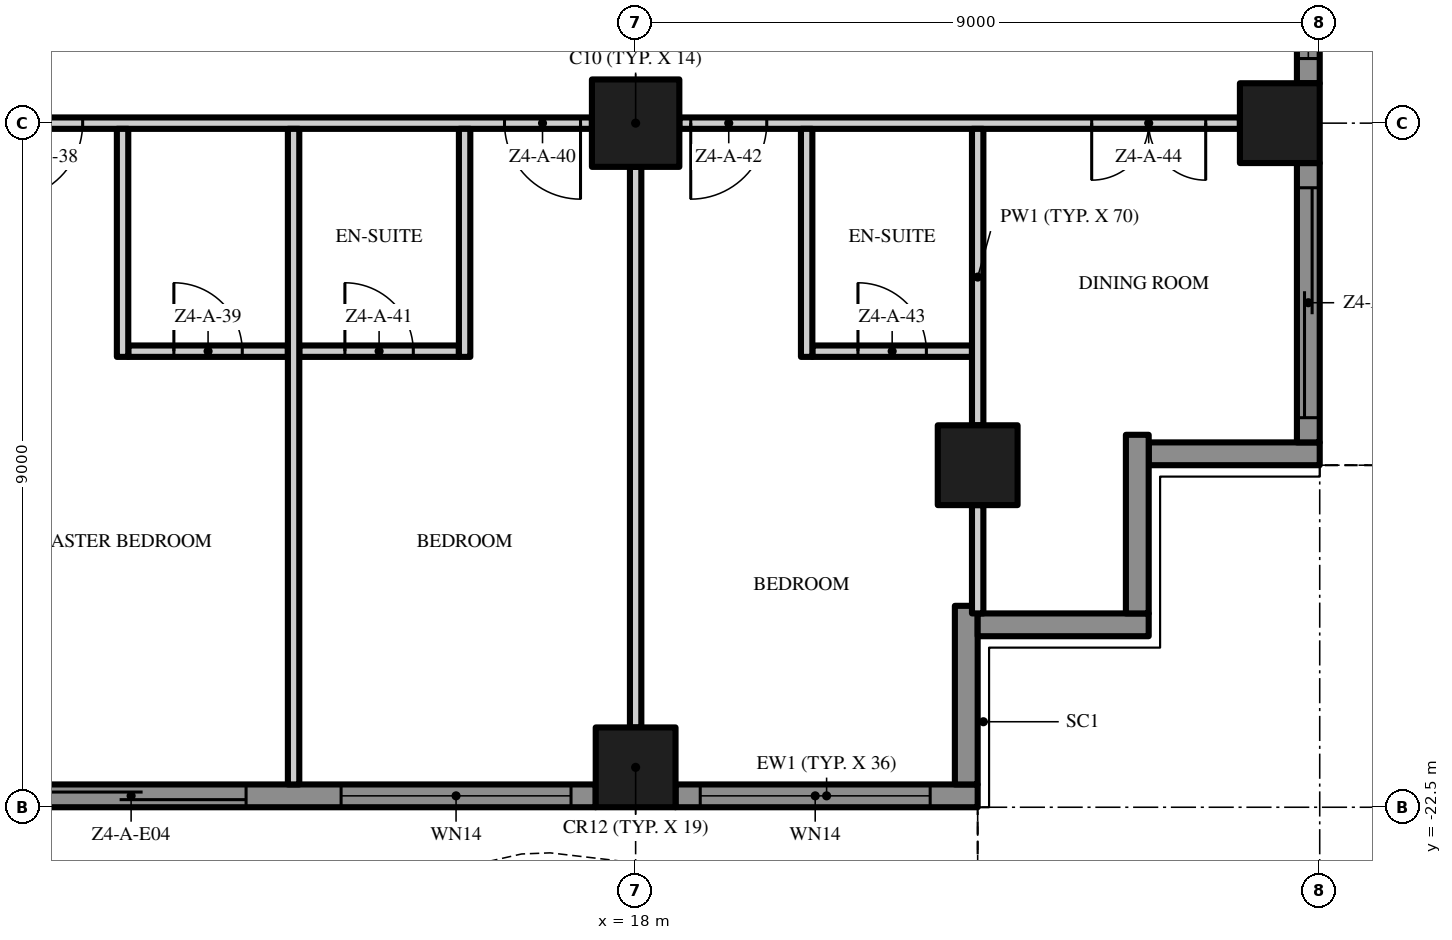
"""IFC4 building model, lengths in metres.
Left out: names, types, materials, properties, quantities, classifications, styles, units other than length and angle.
Written with IfcOpenShell. Run it as: python <this file> out.ifc"""

import sys

from ifc_helpers import new_model, si_unit, direction, frame, frame_2d, origin, origin_2d, place, context, subcontext, project, spatial, polyline, rectangle, outline, extrude, element, fill, save


model = new_model("IFC4")
c1 = context("Model", 3, precision=1e-05, world=origin(), true_north=direction((0.0, 1.0)))
c2 = subcontext(c1, "Body", "Model", "MODEL_VIEW")
j1 = project(units=[si_unit("LENGTHUNIT", "METRE"), si_unit("PLANEANGLEUNIT", "RADIAN")], contexts=[c1])
p1 = place(None, origin())
s1 = spatial("IfcSite", under=j1, at=p1, CompositionType="ELEMENT")
p2 = place(p1, origin())
s2 = spatial("IfcBuilding", under=s1, at=p2, CompositionType="ELEMENT")
p3 = place(p2, frame((0.0, 0.0, 184.4)))
s3 = spatial("IfcBuildingStorey", under=s2, at=p3, CompositionType="ELEMENT", Elevation=184.4)
p4 = place(p3, frame((18.0, -13.5, 0.0), z_axis=(0.0, 0.0, 1.0), x_axis=(1.0, 0.0, 0.0)))
e1 = element("IfcColumn", 1, at=p4, inside=s3, PredefinedType="COLUMN", context=c2, shape_type="SweptSolid", body=[
    extrude(rectangle(XDim=1.15, YDim=1.15, at=origin_2d()), origin(), (0.0, 0.0, 1.0), 3.5),
])
for number, where, z_axis, x_axis in (
    (2, (18.0, -21.975, 0.0), (0.0, 0.0, 1.0), (1.0, 0.0, 0.0)),
    (3, (26.475, -13.5, 0.0), (0.0, 0.0, 1.0), (1.0, 0.0, 0.0)),
    (4, (22.5, -18.0, 0.0), (0.0, 0.0, 1.0), (1.0, 0.0, 0.0)),
):
    element("IfcColumn", number, at=place(p3, frame(where, z_axis=z_axis, x_axis=x_axis)), inside=s3, PredefinedType="COLUMN", context=c2, shape_type="SweptSolid", body=[
        extrude(rectangle(XDim=1.05, YDim=1.05, at=origin_2d()), origin(), (0.0, 0.0, 1.0), 3.5),
    ])
p5 = place(p3, frame((17.475, -22.35, 0.0), z_axis=(0.0, 0.0, 1.0), x_axis=(-1.0, 0.0, 0.0)))
e5 = element("IfcWall", 5, at=p5, inside=s3, PredefinedType="SOLIDWALL", context=c2, shape_type="SweptSolid", body=[
    extrude(rectangle(XDim=7.95, YDim=0.3, at=frame_2d((3.975, 0.0))), origin(), (0.0, 0.0, 1.0), 3.5),
])
p6 = place(p5, frame((4.6, 0.0, 0.0)))
e6 = element("IfcOpeningElement", 6, at=p6, cuts=e5, PredefinedType="OPENING", context=c2, shape_type="SweptSolid", body=[
    extrude(rectangle(XDim=3.025, YDim=2.4, at=frame_2d((1.512, 1.2))), frame((0.0, 0.16, 0.0), z_axis=(0.0, -1.0, 0.0), x_axis=(1.0, 0.0, 0.0)), (0.0, 0.0, 1.0), 0.32),
])
p7 = place(p5, frame((0.325, 0.0, 0.45)))
e7 = element("IfcOpeningElement", 7, at=p7, cuts=e5, PredefinedType="OPENING", context=c2, shape_type="SweptSolid", body=[
    extrude(rectangle(XDim=3.025, YDim=2.65, at=frame_2d((1.512, 1.325))), frame((0.0, 0.16, 0.0), z_axis=(0.0, -1.0, 0.0), x_axis=(1.0, 0.0, 0.0)), (0.0, 0.0, 1.0), 0.32),
])
p8 = place(p3, frame((22.5, -22.35, 0.0), z_axis=(0.0, 0.0, 1.0), x_axis=(-1.0, 0.0, 0.0)))
e8 = element("IfcWall", 8, at=p8, inside=s3, PredefinedType="SOLIDWALL", context=c2, shape_type="SweptSolid", body=[
    extrude(rectangle(XDim=3.975, YDim=0.3, at=frame_2d((1.988, 0.0))), origin(), (0.0, 0.0, 1.0), 3.5),
])
p9 = place(p8, frame((0.625, 0.0, 0.45)))
e9 = element("IfcOpeningElement", 9, at=p9, cuts=e8, PredefinedType="OPENING", context=c2, shape_type="SweptSolid", body=[
    extrude(rectangle(XDim=3.025, YDim=2.65, at=frame_2d((1.512, 1.325))), frame((0.0, 0.16, 0.0), z_axis=(0.0, -1.0, 0.0), x_axis=(1.0, 0.0, 0.0)), (0.0, 0.0, 1.0), 0.32),
])
p10 = place(p3, frame((22.35, -19.85, 0.0), z_axis=(0.0, 0.0, 1.0), x_axis=(0.0, -1.0, 0.0)))
e10 = element("IfcWall", 10, at=p10, inside=s3, PredefinedType="SOLIDWALL", context=c2, shape_type="SweptSolid", body=[
    extrude(rectangle(XDim=2.35, YDim=0.3, at=frame_2d((1.175, 0.0))), origin(), (0.0, 0.0, 1.0), 3.5),
])
p11 = place(p3, frame((24.75, -20.1, 0.0), z_axis=(0.0, 0.0, 1.0), x_axis=(-1.0, 0.0, 0.0)))
e11 = element("IfcWall", 11, at=p11, inside=s3, PredefinedType="SOLIDWALL", context=c2, shape_type="SweptSolid", body=[
    extrude(rectangle(XDim=2.25, YDim=0.3, at=frame_2d((1.125, 0.0))), origin(), (0.0, 0.0, 1.0), 3.5),
])
p12 = place(p3, frame((24.6, -17.6, 0.0), z_axis=(0.0, 0.0, 1.0), x_axis=(0.0, -1.0, 0.0)))
e12 = element("IfcWall", 12, at=p12, inside=s3, PredefinedType="SOLIDWALL", context=c2, shape_type="SweptSolid", body=[
    extrude(rectangle(XDim=2.35, YDim=0.3, at=frame_2d((1.175, 0.0))), origin(), (0.0, 0.0, 1.0), 3.5),
])
p13 = place(p3, frame((27.0, -17.85, 0.0), z_axis=(0.0, 0.0, 1.0), x_axis=(-1.0, 0.0, 0.0)))
e13 = element("IfcWall", 13, at=p13, inside=s3, PredefinedType="SOLIDWALL", context=c2, shape_type="SweptSolid", body=[
    extrude(rectangle(XDim=2.25, YDim=0.3, at=frame_2d((1.125, 0.0))), origin(), (0.0, 0.0, 1.0), 3.5),
])
p14 = place(p3, frame((26.85, -14.025, 0.0), z_axis=(0.0, 0.0, 1.0), x_axis=(0.0, -1.0, 0.0)))
e14 = element("IfcWall", 14, at=p14, inside=s3, PredefinedType="SOLIDWALL", context=c2, shape_type="SweptSolid", body=[
    extrude(rectangle(XDim=3.675, YDim=0.3, at=frame_2d((1.837, 0.0))), origin(), (0.0, 0.0, 1.0), 3.5),
])
p15 = place(p14, frame((0.325, 0.0, 0.0)))
e15 = element("IfcOpeningElement", 15, at=p15, cuts=e14, PredefinedType="OPENING", context=c2, shape_type="SweptSolid", body=[
    extrude(rectangle(XDim=3.025, YDim=2.4, at=frame_2d((1.512, 1.2))), frame((0.0, 0.16, 0.0), z_axis=(0.0, -1.0, 0.0), x_axis=(1.0, 0.0, 0.0)), (0.0, 0.0, 1.0), 0.32),
])
p16 = place(p3, frame((26.85, -5.025, 0.0), z_axis=(0.0, 0.0, 1.0), x_axis=(0.0, -1.0, 0.0)))
e16 = element("IfcWall", 16, at=p16, inside=s3, PredefinedType="SOLIDWALL", context=c2, shape_type="SweptSolid", body=[
    extrude(rectangle(XDim=7.95, YDim=0.3, at=frame_2d((3.975, 0.0))), origin(), (0.0, 0.0, 1.0), 3.5),
])
p17 = place(p16, frame((4.6, 0.0, 0.45)))
e17 = element("IfcOpeningElement", 17, at=p17, cuts=e16, PredefinedType="OPENING", context=c2, shape_type="SweptSolid", body=[
    extrude(rectangle(XDim=3.025, YDim=2.65, at=frame_2d((1.512, 1.325))), frame((0.0, 0.16, 0.0), z_axis=(0.0, -1.0, 0.0), x_axis=(1.0, 0.0, 0.0)), (0.0, 0.0, 1.0), 0.32),
])
p18 = place(p16, frame((0.325, 0.0, 0.45)))
e18 = element("IfcOpeningElement", 18, at=p18, cuts=e16, PredefinedType="OPENING", context=c2, shape_type="SweptSolid", body=[
    extrude(rectangle(XDim=3.025, YDim=2.65, at=frame_2d((1.512, 1.325))), frame((0.0, 0.16, 0.0), z_axis=(0.0, -1.0, 0.0), x_axis=(1.0, 0.0, 0.0)), (0.0, 0.0, 1.0), 0.32),
])
p19 = place(p3, origin())
e19 = element("IfcWall", 19, at=p19, inside=s3, PredefinedType="USERDEFINED", context=c2, shape_type="SweptSolid", body=[
    extrude(outline(polyline([(-22.5, -25.149), (-21.0, -25.485), (-20.625, -25.5), (-19.5, -25.369), (-18.0, -24.845), (-16.5, -24.112), (-15.0, -23.451), (-13.5, -23.115), (-13.125, -23.1), (-12.0, -23.231), (-10.5, -23.755), (-9.0, -24.488), (-7.5, -25.149), (-6.0, -25.485), (-5.625, -25.5), (-4.5, -25.369), (-3.0, -24.845), (-1.5, -24.112), (0.0, -23.451), (1.5, -23.115), (1.875, -23.1), (3.0, -23.231), (4.5, -23.755), (6.0, -24.488), (7.5, -25.149), (9.0, -25.485), (9.375, -25.5), (10.5, -25.369), (12.0, -24.845), (13.5, -24.112), (15.0, -23.451), (16.5, -23.115), (16.875, -23.1), (18.0, -23.231), (19.5, -23.755), (21.0, -24.488), (22.5, -25.149), (22.601, -24.92), (21.105, -24.261), (19.596, -23.524), (18.056, -22.986), (16.885, -22.849), (16.467, -22.866), (14.921, -23.213), (13.395, -23.885), (11.904, -24.614), (10.444, -25.124), (9.365, -25.249), (9.033, -25.236), (7.579, -24.91), (6.105, -24.261), (4.596, -23.524), (3.056, -22.986), (1.885, -22.849), (1.467, -22.866), (-0.079, -23.213), (-1.605, -23.885), (-3.096, -24.614), (-4.556, -25.124), (-5.635, -25.249), (-5.967, -25.236), (-7.421, -24.91), (-8.895, -24.261), (-10.404, -23.524), (-11.944, -22.986), (-13.115, -22.849), (-13.533, -22.866), (-15.079, -23.213), (-16.605, -23.885), (-18.096, -24.614), (-19.556, -25.124), (-20.635, -25.249), (-20.967, -25.236), (-22.445, -24.905), (-22.5, -25.149)])), origin(), (0.0, 0.0, 1.0), 0.9),
])
p20 = place(p3, origin())
e20 = element("IfcWall", 20, at=p20, inside=s3, PredefinedType="USERDEFINED", context=c2, shape_type="SweptSolid", body=[
    extrude(outline(polyline([(29.649, -18.0), (29.985, -16.5), (30.0, -16.125), (29.869, -15.0), (29.345, -13.5), (28.612, -12.0), (27.951, -10.5), (27.615, -9.0), (27.6, -8.625), (27.731, -7.5), (28.255, -6.0), (28.988, -4.5), (29.649, -3.0), (29.985, -1.5), (30.0, -1.125), (29.869, 0.0), (29.345, 1.5), (28.612, 3.0), (27.951, 4.5), (27.615, 6.0), (27.6, 6.375), (27.731, 7.5), (28.255, 9.0), (28.988, 10.5), (29.649, 12.0), (29.985, 13.5), (30.0, 13.875), (29.869, 15.0), (29.345, 16.5), (28.612, 18.0), (28.388, 17.89), (29.114, 16.404), (29.624, 14.944), (29.749, 13.865), (29.736, 13.533), (29.41, 12.079), (28.761, 10.605), (28.024, 9.096), (27.486, 7.556), (27.349, 6.385), (27.366, 5.967), (27.713, 4.421), (28.385, 2.895), (29.114, 1.404), (29.624, -0.056), (29.749, -1.135), (29.736, -1.467), (29.41, -2.921), (28.761, -4.395), (28.024, -5.904), (27.486, -7.444), (27.349, -8.615), (27.366, -9.033), (27.713, -10.579), (28.385, -12.105), (29.114, -13.596), (29.624, -15.056), (29.749, -16.135), (29.736, -16.467), (29.405, -17.945), (29.649, -18.0)])), origin(), (0.0, 0.0, 1.0), 0.9),
])
p21 = place(p3, frame((11.325, -16.5, 0.0), z_axis=(0.0, 0.0, 1.0), x_axis=(1.0, 0.0, 0.0)))
e21 = element("IfcWall", 21, at=p21, inside=s3, PredefinedType="PARTITIONING", context=c2, shape_type="SweptSolid", body=[
    extrude(rectangle(XDim=2.1, YDim=0.15, at=frame_2d((1.05, 0.0))), origin(), (0.0, 0.0, 1.0), 3.5),
])
p22 = place(p21, frame((0.6, 0.0, 0.0)))
e22 = element("IfcOpeningElement", 22, at=p22, cuts=e21, PredefinedType="OPENING", context=c2, shape_type="SweptSolid", body=[
    extrude(rectangle(XDim=0.9, YDim=2.1, at=frame_2d((0.45, 1.05))), frame((0.0, 0.085, 0.0), z_axis=(0.0, -1.0, 0.0), x_axis=(1.0, 0.0, 0.0)), (0.0, 0.0, 1.0), 0.17),
])
p23 = place(p3, frame((13.575, -16.5, 0.0), z_axis=(0.0, 0.0, 1.0), x_axis=(1.0, 0.0, 0.0)))
e23 = element("IfcWall", 23, at=p23, inside=s3, PredefinedType="PARTITIONING", context=c2, shape_type="SweptSolid", body=[
    extrude(rectangle(XDim=2.1, YDim=0.15, at=frame_2d((1.05, 0.0))), origin(), (0.0, 0.0, 1.0), 3.5),
])
p24 = place(p23, frame((0.6, 0.0, 0.0)))
e24 = element("IfcOpeningElement", 24, at=p24, cuts=e23, PredefinedType="OPENING", context=c2, shape_type="SweptSolid", body=[
    extrude(rectangle(XDim=0.9, YDim=2.1, at=frame_2d((0.45, 1.05))), frame((0.0, 0.085, 0.0), z_axis=(0.0, -1.0, 0.0), x_axis=(1.0, 0.0, 0.0)), (0.0, 0.0, 1.0), 0.17),
])
p25 = place(p3, frame((20.325, -16.5, 0.0), z_axis=(0.0, 0.0, 1.0), x_axis=(1.0, 0.0, 0.0)))
e25 = element("IfcWall", 25, at=p25, inside=s3, PredefinedType="PARTITIONING", context=c2, shape_type="SweptSolid", body=[
    extrude(rectangle(XDim=2.1, YDim=0.15, at=frame_2d((1.05, 0.0))), origin(), (0.0, 0.0, 1.0), 3.5),
])
p26 = place(p25, frame((0.6, 0.0, 0.0)))
e26 = element("IfcOpeningElement", 26, at=p26, cuts=e25, PredefinedType="OPENING", context=c2, shape_type="SweptSolid", body=[
    extrude(rectangle(XDim=0.9, YDim=2.1, at=frame_2d((0.45, 1.05))), frame((0.0, 0.085, 0.0), z_axis=(0.0, -1.0, 0.0), x_axis=(1.0, 0.0, 0.0)), (0.0, 0.0, 1.0), 0.17),
])
p27 = place(p3, frame((17.425, -13.5, 0.0), z_axis=(0.0, 0.0, 1.0), x_axis=(-1.0, 0.0, 0.0)))
e27 = element("IfcWall", 27, at=p27, inside=s3, PredefinedType="PARTITIONING", context=c2, shape_type="SweptSolid", body=[
    extrude(rectangle(XDim=7.85, YDim=0.15, at=frame_2d((3.925, 0.0))), origin(), (0.0, 0.0, 1.0), 3.5),
])
p28 = place(p27, frame((6.7, 0.0, 0.0)))
e28 = element("IfcOpeningElement", 28, at=p28, cuts=e27, PredefinedType="OPENING", context=c2, shape_type="SweptSolid", body=[
    extrude(rectangle(XDim=1.0, YDim=2.4, at=frame_2d((0.5, 1.2))), frame((0.0, 0.085, 0.0), z_axis=(0.0, -1.0, 0.0), x_axis=(1.0, 0.0, 0.0)), (0.0, 0.0, 1.0), 0.17),
])
p29 = place(p27, frame((0.15, 0.0, 0.0)))
e29 = element("IfcOpeningElement", 29, at=p29, cuts=e27, PredefinedType="OPENING", context=c2, shape_type="SweptSolid", body=[
    extrude(rectangle(XDim=1.0, YDim=2.4, at=frame_2d((0.5, 1.2))), frame((0.0, 0.085, 0.0), z_axis=(0.0, -1.0, 0.0), x_axis=(1.0, 0.0, 0.0)), (0.0, 0.0, 1.0), 0.17),
])
p30 = place(p3, frame((25.95, -13.5, 0.0), z_axis=(0.0, 0.0, 1.0), x_axis=(-1.0, 0.0, 0.0)))
e30 = element("IfcWall", 30, at=p30, inside=s3, PredefinedType="PARTITIONING", context=c2, shape_type="SweptSolid", body=[
    extrude(rectangle(XDim=7.375, YDim=0.15, at=frame_2d((3.688, 0.0))), origin(), (0.0, 0.0, 1.0), 3.5),
])
p31 = place(p30, frame((6.225, 0.0, 0.0)))
e31 = element("IfcOpeningElement", 31, at=p31, cuts=e30, PredefinedType="OPENING", context=c2, shape_type="SweptSolid", body=[
    extrude(rectangle(XDim=1.0, YDim=2.4, at=frame_2d((0.5, 1.2))), frame((0.0, 0.085, 0.0), z_axis=(0.0, -1.0, 0.0), x_axis=(1.0, 0.0, 0.0)), (0.0, 0.0, 1.0), 0.17),
])
p32 = place(p30, frame((0.45, 0.0, 0.0)))
e32 = element("IfcOpeningElement", 32, at=p32, cuts=e30, PredefinedType="OPENING", context=c2, shape_type="SweptSolid", body=[
    extrude(rectangle(XDim=1.5, YDim=2.4, at=frame_2d((0.75, 1.2))), frame((0.0, 0.085, 0.0), z_axis=(0.0, -1.0, 0.0), x_axis=(1.0, 0.0, 0.0)), (0.0, 0.0, 1.0), 0.17),
])
p33 = place(p3, frame((11.25, -16.575, 0.0), z_axis=(0.0, 0.0, 1.0), x_axis=(0.0, 1.0, 0.0)))
e33 = element("IfcWall", 33, at=p33, inside=s3, PredefinedType="PARTITIONING", context=c2, shape_type="SweptSolid", body=[
    extrude(rectangle(XDim=3.0, YDim=0.15, at=frame_2d((1.5, 0.0))), origin(), (0.0, 0.0, 1.0), 3.5),
])
p34 = place(p3, frame((13.5, -22.2, 0.0), z_axis=(0.0, 0.0, 1.0), x_axis=(0.0, 1.0, 0.0)))
e34 = element("IfcWall", 34, at=p34, inside=s3, PredefinedType="PARTITIONING", context=c2, shape_type="SweptSolid", body=[
    extrude(rectangle(XDim=8.625, YDim=0.15, at=frame_2d((4.312, 0.0))), origin(), (0.0, 0.0, 1.0), 3.5),
])
p35 = place(p3, frame((15.75, -16.575, 0.0), z_axis=(0.0, 0.0, 1.0), x_axis=(0.0, 1.0, 0.0)))
e35 = element("IfcWall", 35, at=p35, inside=s3, PredefinedType="PARTITIONING", context=c2, shape_type="SweptSolid", body=[
    extrude(rectangle(XDim=3.0, YDim=0.15, at=frame_2d((1.5, 0.0))), origin(), (0.0, 0.0, 1.0), 3.5),
])
p36 = place(p3, frame((18.0, -21.45, 0.0), z_axis=(0.0, 0.0, 1.0), x_axis=(0.0, 1.0, 0.0)))
e36 = element("IfcWall", 36, at=p36, inside=s3, PredefinedType="PARTITIONING", context=c2, shape_type="SweptSolid", body=[
    extrude(rectangle(XDim=7.375, YDim=0.15, at=frame_2d((3.688, 0.0))), origin(), (0.0, 0.0, 1.0), 3.5),
])
p37 = place(p3, frame((20.25, -16.575, 0.0), z_axis=(0.0, 0.0, 1.0), x_axis=(0.0, 1.0, 0.0)))
e37 = element("IfcWall", 37, at=p37, inside=s3, PredefinedType="PARTITIONING", context=c2, shape_type="SweptSolid", body=[
    extrude(rectangle(XDim=3.0, YDim=0.15, at=frame_2d((1.5, 0.0))), origin(), (0.0, 0.0, 1.0), 3.5),
])
p38 = place(p3, frame((22.5, -19.95, 0.0), z_axis=(0.0, 0.0, 1.0), x_axis=(0.0, 1.0, 0.0)))
e38 = element("IfcWall", 38, at=p38, inside=s3, PredefinedType="PARTITIONING", context=c2, shape_type="SweptSolid", body=[
    extrude(rectangle(XDim=1.425, YDim=0.15, at=frame_2d((0.713, 0.0))), origin(), (0.0, 0.0, 1.0), 3.5),
])
p39 = place(p3, frame((22.5, -17.475, 0.0), z_axis=(0.0, 0.0, 1.0), x_axis=(0.0, 1.0, 0.0)))
e39 = element("IfcWall", 39, at=p39, inside=s3, PredefinedType="PARTITIONING", context=c2, shape_type="SweptSolid", body=[
    extrude(rectangle(XDim=3.9, YDim=0.15, at=frame_2d((1.95, 0.0))), origin(), (0.0, 0.0, 1.0), 3.5),
])
p40 = place(p6, origin())
e40 = element("IfcDoor", 40, at=p40, inside=s3, OperationType="SINGLE_SWING_LEFT", PredefinedType="DOOR", context=c2, shape_type="SweptSolid", body=[
    extrude(rectangle(XDim=3.025, YDim=2.4, at=frame_2d((1.512, 1.2))), frame((0.0, 0.025, 0.0), z_axis=(0.0, -1.0, 0.0), x_axis=(1.0, 0.0, 0.0)), (0.0, 0.0, 1.0), 0.05),
])
fill(e6, e40)
p41 = place(p7, origin())
e41 = element("IfcWindow", 41, at=p41, inside=s3, PartitioningType="SINGLE_PANEL", PredefinedType="WINDOW", context=c2, shape_type="SweptSolid", body=[
    extrude(rectangle(XDim=3.025, YDim=2.65, at=frame_2d((1.512, 1.325))), frame((0.0, 0.03, 0.0), z_axis=(0.0, -1.0, 0.0), x_axis=(1.0, 0.0, 0.0)), (0.0, 0.0, 1.0), 0.06),
])
fill(e7, e41)
p42 = place(p9, origin())
e42 = element("IfcWindow", 42, at=p42, inside=s3, PartitioningType="SINGLE_PANEL", PredefinedType="WINDOW", context=c2, shape_type="SweptSolid", body=[
    extrude(rectangle(XDim=3.025, YDim=2.65, at=frame_2d((1.512, 1.325))), frame((0.0, 0.03, 0.0), z_axis=(0.0, -1.0, 0.0), x_axis=(1.0, 0.0, 0.0)), (0.0, 0.0, 1.0), 0.06),
])
fill(e9, e42)
p43 = place(p15, origin())
e43 = element("IfcDoor", 43, at=p43, inside=s3, OperationType="SINGLE_SWING_LEFT", PredefinedType="DOOR", context=c2, shape_type="SweptSolid", body=[
    extrude(rectangle(XDim=3.025, YDim=2.4, at=frame_2d((1.512, 1.2))), frame((0.0, 0.025, 0.0), z_axis=(0.0, -1.0, 0.0), x_axis=(1.0, 0.0, 0.0)), (0.0, 0.0, 1.0), 0.05),
])
fill(e15, e43)
p44 = place(p17, origin())
e44 = element("IfcWindow", 44, at=p44, inside=s3, PartitioningType="SINGLE_PANEL", PredefinedType="WINDOW", context=c2, shape_type="SweptSolid", body=[
    extrude(rectangle(XDim=3.025, YDim=2.65, at=frame_2d((1.512, 1.325))), frame((0.0, 0.03, 0.0), z_axis=(0.0, -1.0, 0.0), x_axis=(1.0, 0.0, 0.0)), (0.0, 0.0, 1.0), 0.06),
])
fill(e17, e44)
p45 = place(p28, origin())
e45 = element("IfcDoor", 45, at=p45, inside=s3, OperationType="SINGLE_SWING_RIGHT", PredefinedType="DOOR", context=c2, shape_type="SweptSolid", body=[
    extrude(rectangle(XDim=1.0, YDim=2.4, at=frame_2d((0.5, 1.2))), frame((0.0, 0.025, 0.0), z_axis=(0.0, -1.0, 0.0), x_axis=(1.0, 0.0, 0.0)), (0.0, 0.0, 1.0), 0.05),
])
fill(e28, e45)
p46 = place(p22, origin())
e46 = element("IfcDoor", 46, at=p46, inside=s3, OperationType="SINGLE_SWING_LEFT", PredefinedType="DOOR", context=c2, shape_type="SweptSolid", body=[
    extrude(rectangle(XDim=0.9, YDim=2.1, at=frame_2d((0.45, 1.05))), frame((0.0, 0.025, 0.0), z_axis=(0.0, -1.0, 0.0), x_axis=(1.0, 0.0, 0.0)), (0.0, 0.0, 1.0), 0.05),
])
fill(e22, e46)
p47 = place(p29, origin())
e47 = element("IfcDoor", 47, at=p47, inside=s3, OperationType="SINGLE_SWING_LEFT", PredefinedType="DOOR", context=c2, shape_type="SweptSolid", body=[
    extrude(rectangle(XDim=1.0, YDim=2.4, at=frame_2d((0.5, 1.2))), frame((0.0, 0.025, 0.0), z_axis=(0.0, -1.0, 0.0), x_axis=(1.0, 0.0, 0.0)), (0.0, 0.0, 1.0), 0.05),
])
fill(e29, e47)
p48 = place(p24, origin())
e48 = element("IfcDoor", 48, at=p48, inside=s3, OperationType="SINGLE_SWING_LEFT", PredefinedType="DOOR", context=c2, shape_type="SweptSolid", body=[
    extrude(rectangle(XDim=0.9, YDim=2.1, at=frame_2d((0.45, 1.05))), frame((0.0, 0.025, 0.0), z_axis=(0.0, -1.0, 0.0), x_axis=(1.0, 0.0, 0.0)), (0.0, 0.0, 1.0), 0.05),
])
fill(e24, e48)
p49 = place(p31, origin())
e49 = element("IfcDoor", 49, at=p49, inside=s3, OperationType="SINGLE_SWING_RIGHT", PredefinedType="DOOR", context=c2, shape_type="SweptSolid", body=[
    extrude(rectangle(XDim=1.0, YDim=2.4, at=frame_2d((0.5, 1.2))), frame((0.0, 0.025, 0.0), z_axis=(0.0, -1.0, 0.0), x_axis=(1.0, 0.0, 0.0)), (0.0, 0.0, 1.0), 0.05),
])
fill(e31, e49)
p50 = place(p26, origin())
e50 = element("IfcDoor", 50, at=p50, inside=s3, OperationType="SINGLE_SWING_LEFT", PredefinedType="DOOR", context=c2, shape_type="SweptSolid", body=[
    extrude(rectangle(XDim=0.9, YDim=2.1, at=frame_2d((0.45, 1.05))), frame((0.0, 0.025, 0.0), z_axis=(0.0, -1.0, 0.0), x_axis=(1.0, 0.0, 0.0)), (0.0, 0.0, 1.0), 0.05),
])
fill(e26, e50)
p51 = place(p32, origin())
e51 = element("IfcDoor", 51, at=p51, inside=s3, OperationType="DOUBLE_DOOR_SINGLE_SWING", PredefinedType="DOOR", context=c2, shape_type="SweptSolid", body=[
    extrude(rectangle(XDim=1.5, YDim=2.4, at=frame_2d((0.75, 1.2))), frame((0.0, 0.025, 0.0), z_axis=(0.0, -1.0, 0.0), x_axis=(1.0, 0.0, 0.0)), (0.0, 0.0, 1.0), 0.05),
])
fill(e32, e51)
save(model, sys.argv[1])
